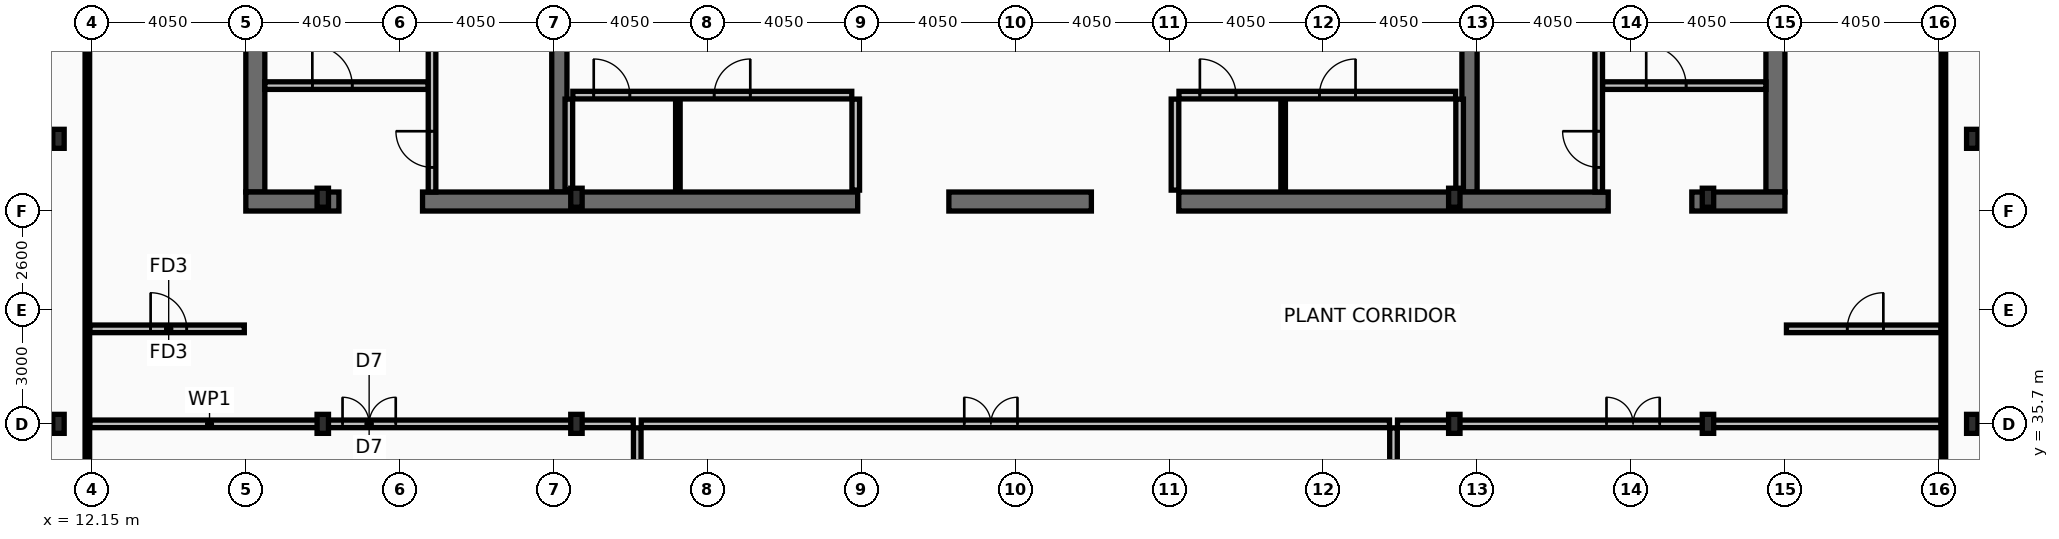
"""IFC4 building model, lengths in metres.
Left out: names, types, materials, properties, quantities, classifications, styles, units other than length and angle.
Written with IfcOpenShell. Run it as: python <this file> out.ifc"""

import sys

from ifc_helpers import new_model, si_unit, direction, frame, frame_2d, origin, origin_2d, place, context, subcontext, project, spatial, rectangle, i_section, extrude, element, fill, save


model = new_model("IFC4")
c1 = context("Model", 3, precision=1e-05, world=origin(), true_north=direction((0.0, 1.0)))
c2 = subcontext(c1, "Body", "Model", "MODEL_VIEW")
j1 = project(units=[si_unit("LENGTHUNIT", "METRE"), si_unit("PLANEANGLEUNIT", "RADIAN")], contexts=[c1])
p1 = place(None, origin())
s1 = spatial("IfcSite", under=j1, at=p1, CompositionType="ELEMENT")
p2 = place(p1, origin())
s2 = spatial("IfcBuilding", under=s1, at=p2, CompositionType="ELEMENT")
p3 = place(p2, frame((0.0, 0.0, 361.8)))
s3 = spatial("IfcBuildingStorey", under=s2, at=p3, CompositionType="ELEMENT", Elevation=361.8)
for number, where, z_axis, x_axis in (
    (1, (16.45, 41.8, 0.0), (0.0, 0.0, 1.0), (0.0, 1.0, 0.0)),
    (2, (56.45, 53.2, 0.0), (0.0, 0.0, 1.0), (0.0, -1.0, 0.0)),
):
    element("IfcWall", number, at=place(p3, frame(where, z_axis=z_axis, x_axis=x_axis)), inside=s3, PredefinedType="SHEAR", context=c2, shape_type="SweptSolid", body=[
        extrude(rectangle(XDim=11.4, YDim=0.5, at=frame_2d((5.7, 0.0))), origin(), (0.0, 0.0, 1.0), 5.4),
    ])
for number, where, z_axis, x_axis in (
    (3, (24.45, 41.8, 0.0), (0.0, 0.0, 1.0), (0.0, 1.0, 0.0)),
    (4, (48.4, 41.8, 0.0), (0.0, 0.0, 1.0), (0.0, 1.0, 0.0)),
):
    element("IfcWall", number, at=place(p3, frame(where, z_axis=z_axis, x_axis=x_axis)), inside=s3, PredefinedType="SHEAR", context=c2, shape_type="SweptSolid", body=[
        extrude(rectangle(XDim=11.4, YDim=0.4, at=frame_2d((5.7, 0.0))), origin(), (0.0, 0.0, 1.0), 5.4),
    ])
p4 = place(p3, frame((18.65, 41.55, 0.0), z_axis=(0.0, 0.0, 1.0), x_axis=(-1.0, 0.0, 0.0)))
e5 = element("IfcWall", 5, at=p4, inside=s3, PredefinedType="SHEAR", context=c2, shape_type="SweptSolid", body=[
    extrude(rectangle(XDim=2.45, YDim=0.5, at=frame_2d((1.225, 0.0))), origin(), (0.0, 0.0, 1.0), 5.4),
])
p5 = place(p3, frame((32.3, 41.55, 0.0), z_axis=(0.0, 0.0, 1.0), x_axis=(-1.0, 0.0, 0.0)))
e6 = element("IfcWall", 6, at=p5, inside=s3, PredefinedType="SHEAR", context=c2, shape_type="SweptSolid", body=[
    extrude(rectangle(XDim=11.45, YDim=0.5, at=frame_2d((5.725, 0.0))), origin(), (0.0, 0.0, 1.0), 5.4),
])
p6 = place(p3, frame((38.45, 41.55, 0.0), z_axis=(0.0, 0.0, 1.0), x_axis=(-1.0, 0.0, 0.0)))
e7 = element("IfcWall", 7, at=p6, inside=s3, PredefinedType="SHEAR", context=c2, shape_type="SweptSolid", body=[
    extrude(rectangle(XDim=3.75, YDim=0.5, at=frame_2d((1.875, 0.0))), origin(), (0.0, 0.0, 1.0), 5.4),
])
p7 = place(p3, frame((52.05, 41.55, 0.0), z_axis=(0.0, 0.0, 1.0), x_axis=(-1.0, 0.0, 0.0)))
e8 = element("IfcWall", 8, at=p7, inside=s3, PredefinedType="SHEAR", context=c2, shape_type="SweptSolid", body=[
    extrude(rectangle(XDim=11.3, YDim=0.5, at=frame_2d((5.65, 0.0))), origin(), (0.0, 0.0, 1.0), 5.4),
])
p8 = place(p3, frame((56.7, 41.55, 0.0), z_axis=(0.0, 0.0, 1.0), x_axis=(-1.0, 0.0, 0.0)))
e9 = element("IfcWall", 9, at=p8, inside=s3, PredefinedType="SHEAR", context=c2, shape_type="SweptSolid", body=[
    extrude(rectangle(XDim=2.45, YDim=0.5, at=frame_2d((1.225, 0.0))), origin(), (0.0, 0.0, 1.0), 5.4),
])
for number, where, z_axis, x_axis in (
    (10, (11.27, 35.7, 0.0), (0.0, 0.0, 1.0), (1.0, 0.0, 0.0)),
    (11, (11.27, 43.2, 0.0), (0.0, 0.0, 1.0), (1.0, 0.0, 0.0)),
    (12, (61.63, 35.7, 0.0), (0.0, 0.0, 1.0), (1.0, 0.0, 0.0)),
    (13, (61.63, 43.2, 0.0), (0.0, 0.0, 1.0), (1.0, 0.0, 0.0)),
    (14, (18.225, 35.7, 0.0), (0.0, 0.0, 1.0), (1.0, 0.0, 0.0)),
    (15, (18.225, 41.65, 0.0), (0.0, 0.0, 1.0), (1.0, 0.0, 0.0)),
    (16, (24.9, 35.7, 0.0), (0.0, 0.0, 1.0), (1.0, 0.0, 0.0)),
    (17, (24.9, 41.65, 0.0), (0.0, 0.0, 1.0), (1.0, 0.0, 0.0)),
    (18, (48.0, 35.7, 0.0), (0.0, 0.0, 1.0), (1.0, 0.0, 0.0)),
    (19, (48.0, 41.65, 0.0), (0.0, 0.0, 1.0), (1.0, 0.0, 0.0)),
    (20, (54.675, 35.7, 0.0), (0.0, 0.0, 1.0), (1.0, 0.0, 0.0)),
    (21, (54.675, 41.65, 0.0), (0.0, 0.0, 1.0), (1.0, 0.0, 0.0)),
):
    element("IfcColumn", number, at=place(p3, frame(where, z_axis=z_axis, x_axis=x_axis)), inside=s3, PredefinedType="COLUMN", context=c2, shape_type="SweptSolid", body=[
        extrude(i_section(OverallWidth=0.3, OverallDepth=0.5, WebThickness=0.014, FlangeThickness=0.028, at=origin_2d()), origin(), (0.0, 0.0, 1.0), 5.6),
    ])
p9 = place(p3, frame((16.7, 44.6, 0.0), z_axis=(0.0, 0.0, 1.0), x_axis=(1.0, 0.0, 0.0)))
e22 = element("IfcWall", 22, at=p9, inside=s3, PredefinedType="PARTITIONING", context=c2, shape_type="SweptSolid", body=[
    extrude(rectangle(XDim=4.3, YDim=0.2, at=frame_2d((2.15, 0.0))), origin(), (0.0, 0.0, 1.0), 5.4),
])
p10 = place(p9, frame((1.25, 0.0, 0.0)))
e23 = element("IfcOpeningElement", 23, at=p10, cuts=e22, PredefinedType="OPENING", context=c2, shape_type="SweptSolid", body=[
    extrude(rectangle(XDim=1.05, YDim=2.15, at=frame_2d((0.525, 1.075))), frame((0.0, 0.11, 0.0), z_axis=(0.0, -1.0, 0.0), x_axis=(1.0, 0.0, 0.0)), (0.0, 0.0, 1.0), 0.22),
])
p11 = place(p3, frame((21.1, 41.8, 0.0), z_axis=(0.0, 0.0, 1.0), x_axis=(0.0, 1.0, 0.0)))
e24 = element("IfcWall", 24, at=p11, inside=s3, PredefinedType="PARTITIONING", context=c2, shape_type="SweptSolid", body=[
    extrude(rectangle(XDim=4.215, YDim=0.2, at=frame_2d((2.107, 0.0))), origin(), (0.0, 0.0, 1.0), 5.4),
])
p12 = place(p11, frame((0.65, 0.0, 0.0)))
e25 = element("IfcOpeningElement", 25, at=p12, cuts=e24, PredefinedType="OPENING", context=c2, shape_type="SweptSolid", body=[
    extrude(rectangle(XDim=0.95, YDim=2.1, at=frame_2d((0.475, 1.05))), frame((0.0, 0.11, 0.0), z_axis=(0.0, -1.0, 0.0), x_axis=(1.0, 0.0, 0.0)), (0.0, 0.0, 1.0), 0.22),
])
p13 = place(p3, frame((51.9, 44.6, 0.0), z_axis=(0.0, 0.0, 1.0), x_axis=(1.0, 0.0, 0.0)))
e26 = element("IfcWall", 26, at=p13, inside=s3, PredefinedType="PARTITIONING", context=c2, shape_type="SweptSolid", body=[
    extrude(rectangle(XDim=4.3, YDim=0.2, at=frame_2d((2.15, 0.0))), origin(), (0.0, 0.0, 1.0), 5.4),
])
p14 = place(p13, frame((1.15, 0.0, 0.0)))
e27 = element("IfcOpeningElement", 27, at=p14, cuts=e26, PredefinedType="OPENING", context=c2, shape_type="SweptSolid", body=[
    extrude(rectangle(XDim=1.05, YDim=2.15, at=frame_2d((0.525, 1.075))), frame((0.0, 0.11, 0.0), z_axis=(0.0, -1.0, 0.0), x_axis=(1.0, 0.0, 0.0)), (0.0, 0.0, 1.0), 0.22),
])
p15 = place(p3, frame((51.8, 41.8, 0.0), z_axis=(0.0, 0.0, 1.0), x_axis=(0.0, 1.0, 0.0)))
e28 = element("IfcWall", 28, at=p15, inside=s3, PredefinedType="PARTITIONING", context=c2, shape_type="SweptSolid", body=[
    extrude(rectangle(XDim=4.215, YDim=0.2, at=frame_2d((2.107, 0.0))), origin(), (0.0, 0.0, 1.0), 5.4),
])
p16 = place(p15, frame((0.65, 0.0, 0.0)))
e29 = element("IfcOpeningElement", 29, at=p16, cuts=e28, PredefinedType="OPENING", context=c2, shape_type="SweptSolid", body=[
    extrude(rectangle(XDim=0.95, YDim=2.1, at=frame_2d((0.475, 1.05))), frame((0.0, 0.11, 0.0), z_axis=(0.0, -1.0, 0.0), x_axis=(1.0, 0.0, 0.0)), (0.0, 0.0, 1.0), 0.22),
])
for number, where, z_axis, x_axis in (
    (30, (24.7, 41.85, 0.0), (0.0, 0.0, 1.0), (0.0, 1.0, 0.0)),
    (31, (32.25, 41.85, 0.0), (0.0, 0.0, 1.0), (0.0, 1.0, 0.0)),
):
    element("IfcWall", number, at=place(p3, frame(where, z_axis=z_axis, x_axis=x_axis)), inside=s3, PredefinedType="PARTITIONING", context=c2, shape_type="SweptSolid", body=[
        extrude(rectangle(XDim=2.395, YDim=0.2, at=frame_2d((1.198, 0.0))), origin(), (0.0, 0.0, 1.0), 5.4),
    ])
p17 = place(p3, frame((27.569, 41.85, 0.0), z_axis=(0.0, 0.0, 1.0), x_axis=(0.0, 1.0, 0.0)))
e32 = element("IfcWall", 32, at=p17, inside=s3, PredefinedType="PARTITIONING", context=c2, shape_type="SweptSolid", body=[
    extrude(rectangle(XDim=2.395, YDim=0.12, at=frame_2d((1.198, 0.0))), origin(), (0.0, 0.0, 1.0), 5.4),
])
p18 = place(p3, frame((24.805, 44.35, 0.0), z_axis=(0.0, 0.0, 1.0), x_axis=(1.0, 0.0, 0.0)))
e33 = element("IfcWall", 33, at=p18, inside=s3, PredefinedType="PARTITIONING", context=c2, shape_type="SweptSolid", body=[
    extrude(rectangle(XDim=7.34, YDim=0.2, at=frame_2d((3.67, 0.0))), origin(), (0.0, 0.0, 1.0), 5.4),
])
p19 = place(p18, frame((0.55, 0.0, 0.0)))
e34 = element("IfcOpeningElement", 34, at=p19, cuts=e33, PredefinedType="OPENING", context=c2, shape_type="SweptSolid", body=[
    extrude(rectangle(XDim=0.95, YDim=2.1, at=frame_2d((0.475, 1.05))), frame((0.0, 0.11, 0.0), z_axis=(0.0, -1.0, 0.0), x_axis=(1.0, 0.0, 0.0)), (0.0, 0.0, 1.0), 0.22),
])
p20 = place(p18, frame((3.719, 0.0, 0.0)))
e35 = element("IfcOpeningElement", 35, at=p20, cuts=e33, PredefinedType="OPENING", context=c2, shape_type="SweptSolid", body=[
    extrude(rectangle(XDim=0.95, YDim=2.1, at=frame_2d((0.475, 1.05))), frame((0.0, 0.11, 0.0), z_axis=(0.0, -1.0, 0.0), x_axis=(1.0, 0.0, 0.0)), (0.0, 0.0, 1.0), 0.22),
])
for number, where, z_axis, x_axis in (
    (36, (40.65, 41.85, 0.0), (0.0, 0.0, 1.0), (0.0, 1.0, 0.0)),
    (37, (48.14, 41.85, 0.0), (0.0, 0.0, 1.0), (0.0, 1.0, 0.0)),
):
    element("IfcWall", number, at=place(p3, frame(where, z_axis=z_axis, x_axis=x_axis)), inside=s3, PredefinedType="PARTITIONING", context=c2, shape_type="SweptSolid", body=[
        extrude(rectangle(XDim=2.395, YDim=0.2, at=frame_2d((1.198, 0.0))), origin(), (0.0, 0.0, 1.0), 5.4),
    ])
p21 = place(p3, frame((43.496, 41.85, 0.0), z_axis=(0.0, 0.0, 1.0), x_axis=(0.0, 1.0, 0.0)))
e38 = element("IfcWall", 38, at=p21, inside=s3, PredefinedType="PARTITIONING", context=c2, shape_type="SweptSolid", body=[
    extrude(rectangle(XDim=2.395, YDim=0.12, at=frame_2d((1.198, 0.0))), origin(), (0.0, 0.0, 1.0), 5.4),
])
p22 = place(p3, frame((40.755, 44.35, 0.0), z_axis=(0.0, 0.0, 1.0), x_axis=(1.0, 0.0, 0.0)))
e39 = element("IfcWall", 39, at=p22, inside=s3, PredefinedType="PARTITIONING", context=c2, shape_type="SweptSolid", body=[
    extrude(rectangle(XDim=7.28, YDim=0.2, at=frame_2d((3.64, 0.0))), origin(), (0.0, 0.0, 1.0), 5.4),
])
p23 = place(p22, frame((0.55, 0.0, 0.0)))
e40 = element("IfcOpeningElement", 40, at=p23, cuts=e39, PredefinedType="OPENING", context=c2, shape_type="SweptSolid", body=[
    extrude(rectangle(XDim=0.95, YDim=2.1, at=frame_2d((0.475, 1.05))), frame((0.0, 0.11, 0.0), z_axis=(0.0, -1.0, 0.0), x_axis=(1.0, 0.0, 0.0)), (0.0, 0.0, 1.0), 0.22),
])
p24 = place(p22, frame((3.696, 0.0, 0.0)))
e41 = element("IfcOpeningElement", 41, at=p24, cuts=e39, PredefinedType="OPENING", context=c2, shape_type="SweptSolid", body=[
    extrude(rectangle(XDim=0.95, YDim=2.1, at=frame_2d((0.475, 1.05))), frame((0.0, 0.11, 0.0), z_axis=(0.0, -1.0, 0.0), x_axis=(1.0, 0.0, 0.0)), (0.0, 0.0, 1.0), 0.22),
])
p25 = place(p3, frame((12.095, 35.7, 0.0), z_axis=(0.0, 0.0, 1.0), x_axis=(1.0, 0.0, 0.0)))
e42 = element("IfcWall", 42, at=p25, inside=s3, PredefinedType="PARTITIONING", context=c2, shape_type="SweptSolid", body=[
    extrude(rectangle(XDim=14.3, YDim=0.2, at=frame_2d((7.15, 0.0))), origin(), (0.0, 0.0, 1.0), 4.79),
])
p26 = place(p25, frame((6.65, 0.0, 0.0)))
e43 = element("IfcOpeningElement", 43, at=p26, cuts=e42, PredefinedType="OPENING", context=c2, shape_type="SweptSolid", body=[
    extrude(rectangle(XDim=1.4, YDim=2.15, at=frame_2d((0.7, 1.075))), frame((0.0, 0.11, 0.0), z_axis=(0.0, -1.0, 0.0), x_axis=(1.0, 0.0, 0.0)), (0.0, 0.0, 1.0), 0.22),
])
p27 = place(p3, frame((26.605, 35.7, 0.0), z_axis=(0.0, 0.0, 1.0), x_axis=(1.0, 0.0, 0.0)))
e44 = element("IfcWall", 44, at=p27, inside=s3, PredefinedType="PARTITIONING", context=c2, shape_type="SweptSolid", body=[
    extrude(rectangle(XDim=19.69, YDim=0.2, at=frame_2d((9.845, 0.0))), origin(), (0.0, 0.0, 1.0), 5.03),
])
p28 = place(p27, frame((8.5, 0.0, 0.0)))
e45 = element("IfcOpeningElement", 45, at=p28, cuts=e44, PredefinedType="OPENING", context=c2, shape_type="SweptSolid", body=[
    extrude(rectangle(XDim=1.4, YDim=2.15, at=frame_2d((0.7, 1.075))), frame((0.0, 0.11, 0.0), z_axis=(0.0, -1.0, 0.0), x_axis=(1.0, 0.0, 0.0)), (0.0, 0.0, 1.0), 0.22),
])
p29 = place(p3, frame((46.505, 35.7, 0.0), z_axis=(0.0, 0.0, 1.0), x_axis=(1.0, 0.0, 0.0)))
e46 = element("IfcWall", 46, at=p29, inside=s3, PredefinedType="PARTITIONING", context=c2, shape_type="SweptSolid", body=[
    extrude(rectangle(XDim=14.3, YDim=0.2, at=frame_2d((7.15, 0.0))), origin(), (0.0, 0.0, 1.0), 4.79),
])
p30 = place(p29, frame((5.5, 0.0, 0.0)))
e47 = element("IfcOpeningElement", 47, at=p30, cuts=e46, PredefinedType="OPENING", context=c2, shape_type="SweptSolid", body=[
    extrude(rectangle(XDim=1.4, YDim=2.15, at=frame_2d((0.7, 1.075))), frame((0.0, 0.11, 0.0), z_axis=(0.0, -1.0, 0.0), x_axis=(1.0, 0.0, 0.0)), (0.0, 0.0, 1.0), 0.22),
])
for number, where, z_axis, x_axis in (
    (48, (26.5, 10.665, 0.0), (0.0, 0.0, 1.0), (0.0, 1.0, 0.0)),
    (49, (46.4, 10.665, 0.0), (0.0, 0.0, 1.0), (0.0, 1.0, 0.0)),
):
    element("IfcWall", number, at=place(p3, frame(where, z_axis=z_axis, x_axis=x_axis)), inside=s3, PredefinedType="PARTITIONING", context=c2, shape_type="SweptSolid", body=[
        extrude(rectangle(XDim=24.93, YDim=0.2, at=frame_2d((12.465, 0.0))), origin(), (0.0, 0.0, 1.0), 5.03),
    ])
p31 = place(p3, frame((12.095, 38.2, 0.0), z_axis=(0.0, 0.0, 1.0), x_axis=(1.0, 0.0, 0.0)))
e50 = element("IfcWall", 50, at=p31, inside=s3, PredefinedType="PARTITIONING", context=c2, shape_type="SweptSolid", body=[
    extrude(rectangle(XDim=4.065, YDim=0.2, at=frame_2d((2.032, 0.0))), origin(), (0.0, 0.0, 1.0), 5.4),
])
p32 = place(p31, frame((1.6, 0.0, 0.0)))
e51 = element("IfcOpeningElement", 51, at=p32, cuts=e50, PredefinedType="OPENING", context=c2, shape_type="SweptSolid", body=[
    extrude(rectangle(XDim=0.95, YDim=2.1, at=frame_2d((0.475, 1.05))), frame((0.0, 0.11, 0.0), z_axis=(0.0, -1.0, 0.0), x_axis=(1.0, 0.0, 0.0)), (0.0, 0.0, 1.0), 0.22),
])
p33 = place(p3, frame((56.74, 38.2, 0.0), z_axis=(0.0, 0.0, 1.0), x_axis=(1.0, 0.0, 0.0)))
e52 = element("IfcWall", 52, at=p33, inside=s3, PredefinedType="PARTITIONING", context=c2, shape_type="SweptSolid", body=[
    extrude(rectangle(XDim=4.065, YDim=0.2, at=frame_2d((2.032, 0.0))), origin(), (0.0, 0.0, 1.0), 5.4),
])
p34 = place(p33, frame((1.6, 0.0, 0.0)))
e53 = element("IfcOpeningElement", 53, at=p34, cuts=e52, PredefinedType="OPENING", context=c2, shape_type="SweptSolid", body=[
    extrude(rectangle(XDim=0.95, YDim=2.1, at=frame_2d((0.475, 1.05))), frame((0.0, 0.11, 0.0), z_axis=(0.0, -1.0, 0.0), x_axis=(1.0, 0.0, 0.0)), (0.0, 0.0, 1.0), 0.22),
])
for number, where, z_axis, x_axis in (
    (54, (12.03, 10.665, 0.0), (0.0, 0.0, 1.0), (0.0, 1.0, 0.0)),
    (55, (60.87, 10.665, 0.0), (0.0, 0.0, 1.0), (0.0, 1.0, 0.0)),
):
    element("IfcWall", number, at=place(p3, frame(where, z_axis=z_axis, x_axis=x_axis)), inside=s3, PredefinedType="PARTITIONING", context=c2, shape_type="SweptSolid", body=[
        extrude(rectangle(XDim=42.11, YDim=0.12, at=frame_2d((21.055, 0.0))), origin(), (0.0, 0.0, 1.0), 4.79),
    ])
p35 = place(p10, origin())
e56 = element("IfcDoor", 56, at=p35, inside=s3, OperationType="SINGLE_SWING_LEFT", PredefinedType="DOOR", context=c2, shape_type="SweptSolid", body=[
    extrude(rectangle(XDim=1.05, YDim=2.15, at=frame_2d((0.525, 1.075))), frame((0.0, 0.025, 0.0), z_axis=(0.0, -1.0, 0.0), x_axis=(1.0, 0.0, 0.0)), (0.0, 0.0, 1.0), 0.05),
])
fill(e23, e56)
p36 = place(p12, origin())
e57 = element("IfcDoor", 57, at=p36, inside=s3, OperationType="SINGLE_SWING_RIGHT", PredefinedType="DOOR", context=c2, shape_type="SweptSolid", body=[
    extrude(rectangle(XDim=0.95, YDim=2.1, at=frame_2d((0.475, 1.05))), frame((0.0, 0.025, 0.0), z_axis=(0.0, -1.0, 0.0), x_axis=(1.0, 0.0, 0.0)), (0.0, 0.0, 1.0), 0.05),
])
fill(e25, e57)
p37 = place(p14, origin())
e58 = element("IfcDoor", 58, at=p37, inside=s3, OperationType="SINGLE_SWING_LEFT", PredefinedType="DOOR", context=c2, shape_type="SweptSolid", body=[
    extrude(rectangle(XDim=1.05, YDim=2.15, at=frame_2d((0.525, 1.075))), frame((0.0, 0.025, 0.0), z_axis=(0.0, -1.0, 0.0), x_axis=(1.0, 0.0, 0.0)), (0.0, 0.0, 1.0), 0.05),
])
fill(e27, e58)
p38 = place(p16, origin())
e59 = element("IfcDoor", 59, at=p38, inside=s3, OperationType="SINGLE_SWING_RIGHT", PredefinedType="DOOR", context=c2, shape_type="SweptSolid", body=[
    extrude(rectangle(XDim=0.95, YDim=2.1, at=frame_2d((0.475, 1.05))), frame((0.0, 0.025, 0.0), z_axis=(0.0, -1.0, 0.0), x_axis=(1.0, 0.0, 0.0)), (0.0, 0.0, 1.0), 0.05),
])
fill(e29, e59)
p39 = place(p19, origin())
e60 = element("IfcDoor", 60, at=p39, inside=s3, OperationType="SINGLE_SWING_LEFT", PredefinedType="DOOR", context=c2, shape_type="SweptSolid", body=[
    extrude(rectangle(XDim=0.95, YDim=2.1, at=frame_2d((0.475, 1.05))), frame((0.0, 0.025, 0.0), z_axis=(0.0, -1.0, 0.0), x_axis=(1.0, 0.0, 0.0)), (0.0, 0.0, 1.0), 0.05),
])
fill(e34, e60)
p40 = place(p20, origin())
e61 = element("IfcDoor", 61, at=p40, inside=s3, OperationType="SINGLE_SWING_RIGHT", PredefinedType="DOOR", context=c2, shape_type="SweptSolid", body=[
    extrude(rectangle(XDim=0.95, YDim=2.1, at=frame_2d((0.475, 1.05))), frame((0.0, 0.025, 0.0), z_axis=(0.0, -1.0, 0.0), x_axis=(1.0, 0.0, 0.0)), (0.0, 0.0, 1.0), 0.05),
])
fill(e35, e61)
p41 = place(p23, origin())
e62 = element("IfcDoor", 62, at=p41, inside=s3, OperationType="SINGLE_SWING_LEFT", PredefinedType="DOOR", context=c2, shape_type="SweptSolid", body=[
    extrude(rectangle(XDim=0.95, YDim=2.1, at=frame_2d((0.475, 1.05))), frame((0.0, 0.025, 0.0), z_axis=(0.0, -1.0, 0.0), x_axis=(1.0, 0.0, 0.0)), (0.0, 0.0, 1.0), 0.05),
])
fill(e40, e62)
p42 = place(p24, origin())
e63 = element("IfcDoor", 63, at=p42, inside=s3, OperationType="SINGLE_SWING_RIGHT", PredefinedType="DOOR", context=c2, shape_type="SweptSolid", body=[
    extrude(rectangle(XDim=0.95, YDim=2.1, at=frame_2d((0.475, 1.05))), frame((0.0, 0.025, 0.0), z_axis=(0.0, -1.0, 0.0), x_axis=(1.0, 0.0, 0.0)), (0.0, 0.0, 1.0), 0.05),
])
fill(e41, e63)
p43 = place(p26, origin())
e64 = element("IfcDoor", 64, at=p43, inside=s3, OperationType="DOUBLE_DOOR_SINGLE_SWING", PredefinedType="DOOR", context=c2, shape_type="SweptSolid", body=[
    extrude(rectangle(XDim=1.4, YDim=2.15, at=frame_2d((0.7, 1.075))), frame((0.0, 0.025, 0.0), z_axis=(0.0, -1.0, 0.0), x_axis=(1.0, 0.0, 0.0)), (0.0, 0.0, 1.0), 0.05),
])
fill(e43, e64)
p44 = place(p28, origin())
e65 = element("IfcDoor", 65, at=p44, inside=s3, OperationType="DOUBLE_DOOR_SINGLE_SWING", PredefinedType="DOOR", context=c2, shape_type="SweptSolid", body=[
    extrude(rectangle(XDim=1.4, YDim=2.15, at=frame_2d((0.7, 1.075))), frame((0.0, 0.025, 0.0), z_axis=(0.0, -1.0, 0.0), x_axis=(1.0, 0.0, 0.0)), (0.0, 0.0, 1.0), 0.05),
])
fill(e45, e65)
p45 = place(p30, origin())
e66 = element("IfcDoor", 66, at=p45, inside=s3, OperationType="DOUBLE_DOOR_SINGLE_SWING", PredefinedType="DOOR", context=c2, shape_type="SweptSolid", body=[
    extrude(rectangle(XDim=1.4, YDim=2.15, at=frame_2d((0.7, 1.075))), frame((0.0, 0.025, 0.0), z_axis=(0.0, -1.0, 0.0), x_axis=(1.0, 0.0, 0.0)), (0.0, 0.0, 1.0), 0.05),
])
fill(e47, e66)
p46 = place(p32, origin())
e67 = element("IfcDoor", 67, at=p46, inside=s3, OperationType="SINGLE_SWING_LEFT", PredefinedType="DOOR", context=c2, shape_type="SweptSolid", body=[
    extrude(rectangle(XDim=0.95, YDim=2.1, at=frame_2d((0.475, 1.05))), frame((0.0, 0.025, 0.0), z_axis=(0.0, -1.0, 0.0), x_axis=(1.0, 0.0, 0.0)), (0.0, 0.0, 1.0), 0.05),
])
fill(e51, e67)
p47 = place(p34, origin())
e68 = element("IfcDoor", 68, at=p47, inside=s3, OperationType="SINGLE_SWING_RIGHT", PredefinedType="DOOR", context=c2, shape_type="SweptSolid", body=[
    extrude(rectangle(XDim=0.95, YDim=2.1, at=frame_2d((0.475, 1.05))), frame((0.0, 0.025, 0.0), z_axis=(0.0, -1.0, 0.0), x_axis=(1.0, 0.0, 0.0)), (0.0, 0.0, 1.0), 0.05),
])
fill(e53, e68)
save(model, sys.argv[1])
